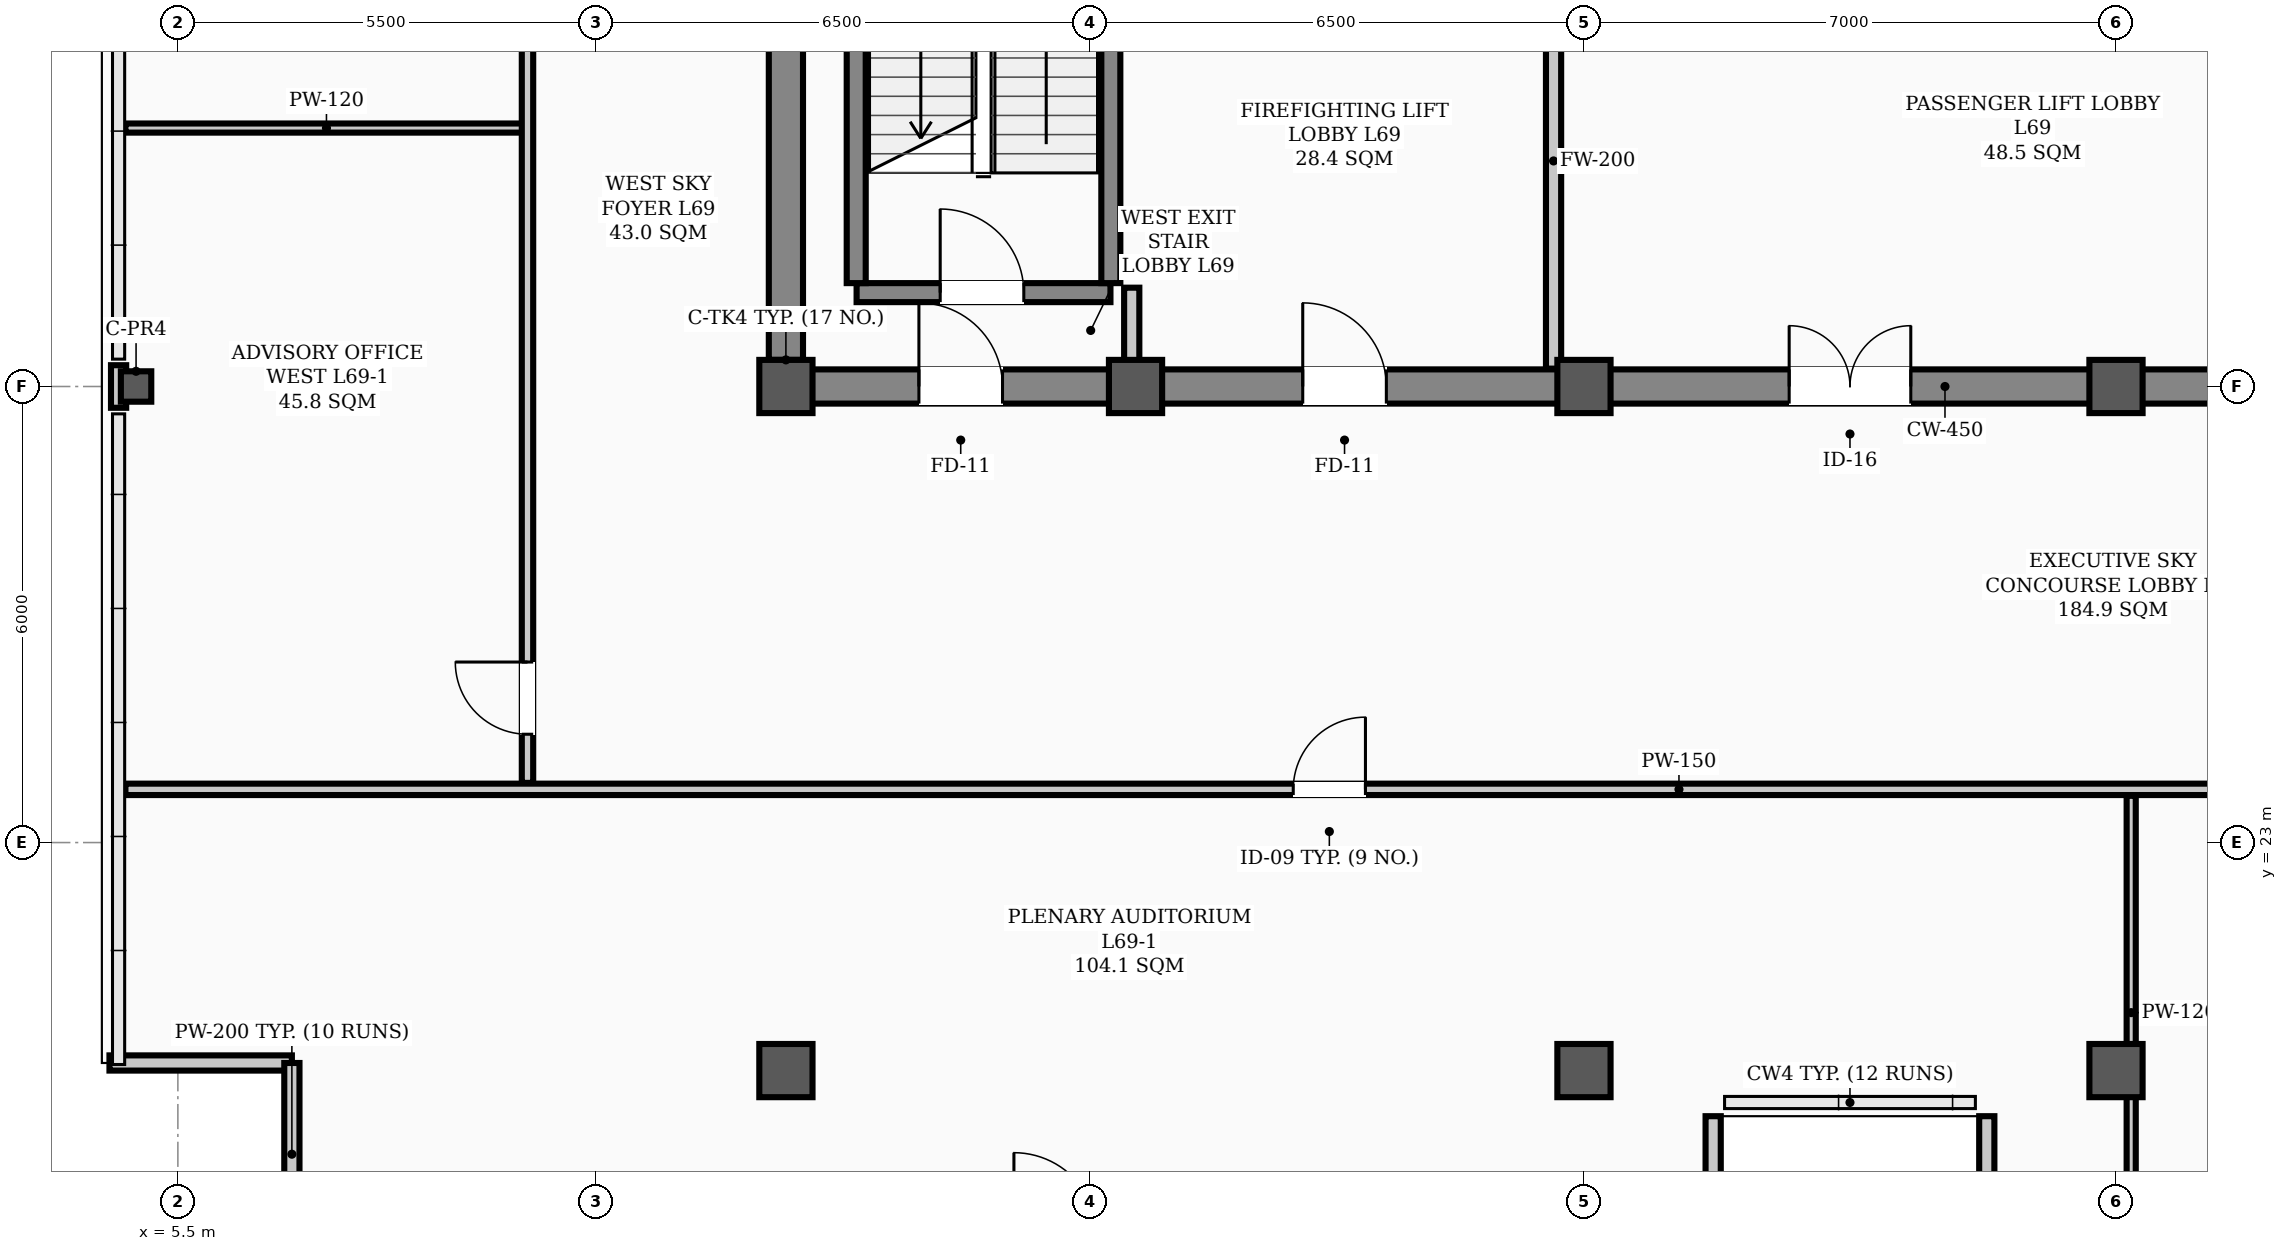
"""IFC4 building model, lengths in metres.
Left out: names, types, materials, properties, quantities, classifications, styles, units other than length and angle.
Written with IfcOpenShell. Run it as: python <this file> out.ifc"""

import sys

from ifc_helpers import new_model, si_unit, direction, frame, frame_2d, origin, origin_2d, place, context, subcontext, project, spatial, rectangle, hollow_rectangle, extrude, element, fill, save


model = new_model("IFC4")
c1 = context("Model", 3, precision=1e-05, world=origin(), true_north=direction((0.0, 1.0)))
c2 = subcontext(c1, "Body", "Model", "MODEL_VIEW")
j1 = project(units=[si_unit("LENGTHUNIT", "METRE"), si_unit("PLANEANGLEUNIT", "RADIAN")], contexts=[c1])
p1 = place(None, origin())
s1 = spatial("IfcSite", under=j1, at=p1, CompositionType="ELEMENT")
p2 = place(p1, origin())
s2 = spatial("IfcBuilding", under=s1, at=p2, CompositionType="ELEMENT")
p3 = place(p2, frame((0.0, 0.0, 277.4)))
s3 = spatial("IfcBuildingStorey", under=s2, at=p3, CompositionType="ELEMENT", Elevation=277.4)
for number, where, z_axis, x_axis in (
    (1, (13.5, 29.0, 0.0), (0.0, 0.0, 1.0), (1.0, 0.0, 0.0)),
    (2, (18.1, 29.0, 0.0), (0.0, 0.0, 1.0), (1.0, 0.0, 0.0)),
    (3, (24.0, 29.0, 0.0), (0.0, 0.0, 1.0), (1.0, 0.0, 0.0)),
    (4, (31.0, 29.0, 0.0), (0.0, 0.0, 1.0), (1.0, 0.0, 0.0)),
    (5, (13.5, 20.0, 0.0), (0.0, 0.0, 1.0), (1.0, 0.0, 0.0)),
    (6, (24.0, 20.0, 0.0), (0.0, 0.0, 1.0), (1.0, 0.0, 0.0)),
    (7, (31.0, 20.0, 0.0), (0.0, 0.0, 1.0), (1.0, 0.0, 0.0)),
):
    element("IfcColumn", number, at=place(p3, frame(where, z_axis=z_axis, x_axis=x_axis)), inside=s3, PredefinedType="COLUMN", context=c2, shape_type="SweptSolid", body=[
        extrude(hollow_rectangle(XDim=0.7, YDim=0.7, WallThickness=0.028, InnerFilletRadius=0.014, OuterFilletRadius=0.042, at=origin_2d()), origin(), (0.0, 0.0, 1.0), 3.9),
    ])
p4 = place(p3, frame((4.95, 29.0, 0.0), z_axis=(0.0, 0.0, 1.0), x_axis=(1.0, 0.0, 0.0)))
e8 = element("IfcColumn", 8, at=p4, inside=s3, PredefinedType="COLUMN", context=c2, shape_type="SweptSolid", body=[
    extrude(hollow_rectangle(XDim=0.4, YDim=0.4, WallThickness=0.02, InnerFilletRadius=0.02, OuterFilletRadius=0.04, at=origin_2d()), origin(), (0.0, 0.0, 1.0), 3.66),
])
p5 = place(p3, frame((4.72, 28.72, 0.0), z_axis=(0.0, 0.0, 1.0), x_axis=(0.0, 1.0, 0.0)))
e9 = element("IfcWall", 9, at=p5, inside=s3, PredefinedType="PARAPET", context=c2, shape_type="SweptSolid", body=[
    extrude(rectangle(XDim=0.56, YDim=0.2, at=frame_2d((0.28, 0.0))), origin(), (0.0, 0.0, 1.0), 1.2),
])
p6 = place(p3, frame((4.6, 20.1, 0.0), z_axis=(0.0, 0.0, 1.0), x_axis=(1.0, 0.0, 0.0)))
e10 = element("IfcWall", 10, at=p6, inside=s3, PredefinedType="PARAPET", context=c2, shape_type="SweptSolid", body=[
    extrude(rectangle(XDim=2.4, YDim=0.2, at=frame_2d((1.2, 0.0))), origin(), (0.0, 0.0, 1.0), 1.2),
])
p7 = place(p3, frame((7.0, 20.1, 0.0), z_axis=(0.0, 0.0, 1.0), x_axis=(0.0, -1.0, 0.0)))
e11 = element("IfcWall", 11, at=p7, inside=s3, PredefinedType="PARAPET", context=c2, shape_type="SweptSolid", body=[
    extrude(rectangle(XDim=2.4, YDim=0.2, at=frame_2d((1.2, 0.0))), origin(), (0.0, 0.0, 1.0), 1.2),
])
for number, where, z_axis, x_axis in (
    (12, (25.7, 17.7, 0.0), (0.0, 0.0, 1.0), (0.0, 1.0, 0.0)),
    (13, (29.3, 19.4, 0.0), (0.0, 0.0, 1.0), (0.0, -1.0, 0.0)),
):
    element("IfcWall", number, at=place(p3, frame(where, z_axis=z_axis, x_axis=x_axis)), inside=s3, PredefinedType="PARAPET", context=c2, shape_type="SweptSolid", body=[
        extrude(rectangle(XDim=1.7, YDim=0.2, at=frame_2d((0.85, 0.0))), origin(), (0.0, 0.0, 1.0), 1.2),
    ])
p8 = place(p3, frame((13.5, 29.0, 0.0), z_axis=(0.0, 0.0, 1.0), x_axis=(1.0, 0.0, 0.0)))
e14 = element("IfcWall", 14, at=p8, inside=s3, PredefinedType="SHEAR", context=c2, shape_type="SweptSolid", body=[
    extrude(rectangle(XDim=30.5, YDim=0.45, at=frame_2d((15.25, 0.0))), origin(), (0.0, 0.0, 1.0), 3.66),
])
p9 = place(p8, frame((1.75, 0.0, 0.0)))
e15 = element("IfcOpeningElement", 15, at=p9, cuts=e14, PredefinedType="OPENING", context=c2, shape_type="SweptSolid", body=[
    extrude(rectangle(XDim=1.1, YDim=2.08, at=frame_2d((0.55, 1.04))), frame((0.0, 0.235, 0.0), z_axis=(0.0, -1.0, 0.0), x_axis=(1.0, 0.0, 0.0)), (0.0, 0.0, 1.0), 0.47),
])
p10 = place(p8, frame((26.7, 0.0, 0.0)))
e16 = element("IfcOpeningElement", 16, at=p10, cuts=e14, PredefinedType="OPENING", context=c2, shape_type="SweptSolid", body=[
    extrude(rectangle(XDim=1.1, YDim=2.08, at=frame_2d((0.55, 1.04))), frame((0.0, 0.235, 0.0), z_axis=(0.0, -1.0, 0.0), x_axis=(1.0, 0.0, 0.0)), (0.0, 0.0, 1.0), 0.47),
])
p11 = place(p8, frame((6.8, 0.0, 0.0)))
e17 = element("IfcOpeningElement", 17, at=p11, cuts=e14, PredefinedType="OPENING", context=c2, shape_type="SweptSolid", body=[
    extrude(rectangle(XDim=1.1, YDim=2.08, at=frame_2d((0.55, 1.04))), frame((0.0, 0.235, 0.0), z_axis=(0.0, -1.0, 0.0), x_axis=(1.0, 0.0, 0.0)), (0.0, 0.0, 1.0), 0.47),
])
p12 = place(p8, frame((13.2, 0.0, 0.0)))
e18 = element("IfcOpeningElement", 18, at=p12, cuts=e14, PredefinedType="OPENING", context=c2, shape_type="SweptSolid", body=[
    extrude(rectangle(XDim=1.6, YDim=2.08, at=frame_2d((0.8, 1.04))), frame((0.0, 0.235, 0.0), z_axis=(0.0, -1.0, 0.0), x_axis=(1.0, 0.0, 0.0)), (0.0, 0.0, 1.0), 0.47),
])
p13 = place(p8, frame((19.5, 0.0, 0.0)))
e19 = element("IfcOpeningElement", 19, at=p13, cuts=e14, PredefinedType="OPENING", context=c2, shape_type="SweptSolid", body=[
    extrude(rectangle(XDim=0.9, YDim=2.08, at=frame_2d((0.45, 1.04))), frame((0.0, 0.235, 0.0), z_axis=(0.0, -1.0, 0.0), x_axis=(1.0, 0.0, 0.0)), (0.0, 0.0, 1.0), 0.47),
])
p14 = place(p8, frame((21.55, 0.0, 0.0)))
e20 = element("IfcOpeningElement", 20, at=p14, cuts=e14, PredefinedType="OPENING", context=c2, shape_type="SweptSolid", body=[
    extrude(rectangle(XDim=0.9, YDim=2.08, at=frame_2d((0.45, 1.04))), frame((0.0, 0.235, 0.0), z_axis=(0.0, -1.0, 0.0), x_axis=(1.0, 0.0, 0.0)), (0.0, 0.0, 1.0), 0.47),
])
p15 = place(p3, frame((13.5, 29.35, 0.0), z_axis=(0.0, 0.0, 1.0), x_axis=(0.0, 1.0, 0.0)))
e21 = element("IfcWall", 21, at=p15, inside=s3, PredefinedType="SHEAR", context=c2, shape_type="SweptSolid", body=[
    extrude(rectangle(XDim=8.6, YDim=0.45, at=frame_2d((4.3, 0.0))), origin(), (0.0, 0.0, 1.0), 3.66),
])
p16 = place(p3, frame((14.43, 30.235, 0.0), z_axis=(0.0, 0.0, 1.0), x_axis=(1.0, 0.0, 0.0)))
e22 = element("IfcWall", 22, at=p16, inside=s3, PredefinedType="STANDARD", context=c2, shape_type="SweptSolid", body=[
    extrude(rectangle(XDim=3.34, YDim=0.25, at=frame_2d((1.67, 0.0))), origin(), (0.0, 0.0, 1.0), 3.66),
])
p17 = place(p16, frame((1.1, 0.0, 0.0)))
e23 = element("IfcOpeningElement", 23, at=p17, cuts=e22, PredefinedType="OPENING", context=c2, shape_type="SweptSolid", body=[
    extrude(rectangle(XDim=1.1, YDim=2.08, at=frame_2d((0.55, 1.04))), frame((0.0, 0.135, 0.0), z_axis=(0.0, -1.0, 0.0), x_axis=(1.0, 0.0, 0.0)), (0.0, 0.0, 1.0), 0.27),
])
for number, where, z_axis, x_axis in (
    (24, (14.425, 30.36, 0.0), (0.0, 0.0, 1.0), (0.0, 1.0, 0.0)),
    (25, (17.775, 30.36, 0.0), (0.0, 0.0, 1.0), (0.0, 1.0, 0.0)),
):
    element("IfcWall", number, at=place(p3, frame(where, z_axis=z_axis, x_axis=x_axis)), inside=s3, PredefinedType="STANDARD", context=c2, shape_type="SweptSolid", body=[
        extrude(rectangle(XDim=7.184, YDim=0.25, at=frame_2d((3.592, 0.0))), origin(), (0.0, 0.0, 1.0), 3.66),
    ])
p18 = place(p3, frame((4.81, 23.7, 0.0), z_axis=(0.0, 0.0, 1.0), x_axis=(1.0, 0.0, 0.0)))
e26 = element("IfcWall", 26, at=p18, inside=s3, PredefinedType="PARTITIONING", context=c2, shape_type="SweptSolid", body=[
    extrude(rectangle(XDim=40.88, YDim=0.15, at=frame_2d((20.44, 0.0))), origin(), (0.0, 0.0, 1.0), 2.24),
])
p19 = place(p18, frame((15.365, 0.0, 0.0)))
e27 = element("IfcOpeningElement", 27, at=p19, cuts=e26, PredefinedType="OPENING", context=c2, shape_type="SweptSolid", body=[
    extrude(rectangle(XDim=0.95, YDim=2.08, at=frame_2d((0.475, 1.04))), frame((0.0, 0.085, 0.0), z_axis=(0.0, -1.0, 0.0), x_axis=(1.0, 0.0, 0.0)), (0.0, 0.0, 1.0), 0.17),
])
p20 = place(p18, frame((34.06, 0.0, 0.0)))
e28 = element("IfcOpeningElement", 28, at=p20, cuts=e26, PredefinedType="OPENING", context=c2, shape_type="SweptSolid", body=[
    extrude(rectangle(XDim=0.95, YDim=2.08, at=frame_2d((0.475, 1.04))), frame((0.0, 0.085, 0.0), z_axis=(0.0, -1.0, 0.0), x_axis=(1.0, 0.0, 0.0)), (0.0, 0.0, 1.0), 0.17),
])
p21 = place(p3, frame((4.81, 32.4, 0.0), z_axis=(0.0, 0.0, 1.0), x_axis=(1.0, 0.0, 0.0)))
e29 = element("IfcWall", 29, at=p21, inside=s3, PredefinedType="PARTITIONING", context=c2, shape_type="SweptSolid", body=[
    extrude(rectangle(XDim=5.29, YDim=0.12, at=frame_2d((2.645, 0.0))), origin(), (0.0, 0.0, 1.0), 3.66),
])
p22 = place(p3, frame((18.05, 29.235, 0.0), z_axis=(0.0, 0.0, 1.0), x_axis=(0.0, 1.0, 0.0)))
e30 = element("IfcWall", 30, at=p22, inside=s3, PredefinedType="STANDARD", context=c2, shape_type="SweptSolid", body=[
    extrude(rectangle(XDim=1.065, YDim=0.2, at=frame_2d((0.532, 0.0))), origin(), (0.0, 0.0, 1.0), 2.24),
])
p23 = place(p3, frame((23.6, 29.235, 0.0), z_axis=(0.0, 0.0, 1.0), x_axis=(0.0, 1.0, 0.0)))
e31 = element("IfcWall", 31, at=p23, inside=s3, PredefinedType="STANDARD", context=c2, shape_type="SweptSolid", body=[
    extrude(rectangle(XDim=5.465, YDim=0.2, at=frame_2d((2.732, 0.0))), origin(), (0.0, 0.0, 1.0), 2.24),
])
p24 = place(p3, frame((10.1, 23.785, 0.0), z_axis=(0.0, 0.0, 1.0), x_axis=(0.0, 1.0, 0.0)))
e32 = element("IfcWall", 32, at=p24, inside=s3, PredefinedType="PARTITIONING", context=c2, shape_type="SweptSolid", body=[
    extrude(rectangle(XDim=17.88, YDim=0.15, at=frame_2d((8.94, 0.0))), origin(), (0.0, 0.0, 1.0), 2.24),
])
p25 = place(p24, frame((0.64, 0.0, 0.0)))
e33 = element("IfcOpeningElement", 33, at=p25, cuts=e32, PredefinedType="OPENING", context=c2, shape_type="SweptSolid", body=[
    extrude(rectangle(XDim=0.95, YDim=2.08, at=frame_2d((0.475, 1.04))), frame((0.0, 0.085, 0.0), z_axis=(0.0, -1.0, 0.0), x_axis=(1.0, 0.0, 0.0)), (0.0, 0.0, 1.0), 0.17),
])
p26 = place(p24, frame((9.94, 0.0, 0.0)))
e34 = element("IfcOpeningElement", 34, at=p26, cuts=e32, PredefinedType="OPENING", context=c2, shape_type="SweptSolid", body=[
    extrude(rectangle(XDim=0.95, YDim=2.08, at=frame_2d((0.475, 1.04))), frame((0.0, 0.085, 0.0), z_axis=(0.0, -1.0, 0.0), x_axis=(1.0, 0.0, 0.0)), (0.0, 0.0, 1.0), 0.17),
])
p27 = place(p24, frame((14.615, 0.0, 0.0)))
e35 = element("IfcOpeningElement", 35, at=p27, cuts=e32, PredefinedType="OPENING", context=c2, shape_type="SweptSolid", body=[
    extrude(rectangle(XDim=0.95, YDim=2.08, at=frame_2d((0.475, 1.04))), frame((0.0, 0.085, 0.0), z_axis=(0.0, -1.0, 0.0), x_axis=(1.0, 0.0, 0.0)), (0.0, 0.0, 1.0), 0.17),
])
p28 = place(p3, frame((31.2, 17.91, 0.0), z_axis=(0.0, 0.0, 1.0), x_axis=(0.0, 1.0, 0.0)))
e36 = element("IfcWall", 36, at=p28, inside=s3, PredefinedType="PARTITIONING", context=c2, shape_type="SweptSolid", body=[
    extrude(rectangle(XDim=5.705, YDim=0.12, at=frame_2d((2.853, 0.0))), origin(), (0.0, 0.0, 1.0), 2.24),
])
p29 = place(p17, origin())
e37 = element("IfcDoor", 37, at=p29, inside=s3, OperationType="SINGLE_SWING_LEFT", PredefinedType="DOOR", context=c2, shape_type="SweptSolid", body=[
    extrude(rectangle(XDim=1.1, YDim=2.08, at=frame_2d((0.55, 1.04))), frame((0.0, 0.025, 0.0), z_axis=(0.0, -1.0, 0.0), x_axis=(1.0, 0.0, 0.0)), (0.0, 0.0, 1.0), 0.05),
])
fill(e23, e37)
p30 = place(p9, origin())
e38 = element("IfcDoor", 38, at=p30, inside=s3, OperationType="SINGLE_SWING_LEFT", PredefinedType="DOOR", context=c2, shape_type="SweptSolid", body=[
    extrude(rectangle(XDim=1.1, YDim=2.08, at=frame_2d((0.55, 1.04))), frame((0.0, 0.025, 0.0), z_axis=(0.0, -1.0, 0.0), x_axis=(1.0, 0.0, 0.0)), (0.0, 0.0, 1.0), 0.05),
])
fill(e15, e38)
p31 = place(p11, origin())
e39 = element("IfcDoor", 39, at=p31, inside=s3, OperationType="SINGLE_SWING_LEFT", PredefinedType="DOOR", context=c2, shape_type="SweptSolid", body=[
    extrude(rectangle(XDim=1.1, YDim=2.08, at=frame_2d((0.55, 1.04))), frame((0.0, 0.025, 0.0), z_axis=(0.0, -1.0, 0.0), x_axis=(1.0, 0.0, 0.0)), (0.0, 0.0, 1.0), 0.05),
])
fill(e17, e39)
p32 = place(p12, origin())
e40 = element("IfcDoor", 40, at=p32, inside=s3, OperationType="DOUBLE_DOOR_SINGLE_SWING", PredefinedType="DOOR", context=c2, shape_type="SweptSolid", body=[
    extrude(rectangle(XDim=1.6, YDim=2.08, at=frame_2d((0.8, 1.04))), frame((0.0, 0.025, 0.0), z_axis=(0.0, -1.0, 0.0), x_axis=(1.0, 0.0, 0.0)), (0.0, 0.0, 1.0), 0.05),
])
fill(e18, e40)
p33 = place(p19, origin())
e41 = element("IfcDoor", 41, at=p33, inside=s3, OperationType="SINGLE_SWING_RIGHT", PredefinedType="DOOR", context=c2, shape_type="SweptSolid", body=[
    extrude(rectangle(XDim=0.95, YDim=2.08, at=frame_2d((0.475, 1.04))), frame((0.0, 0.025, 0.0), z_axis=(0.0, -1.0, 0.0), x_axis=(1.0, 0.0, 0.0)), (0.0, 0.0, 1.0), 0.05),
])
fill(e27, e41)
p34 = place(p25, origin())
e42 = element("IfcDoor", 42, at=p34, inside=s3, OperationType="SINGLE_SWING_RIGHT", PredefinedType="DOOR", context=c2, shape_type="SweptSolid", body=[
    extrude(rectangle(XDim=0.95, YDim=2.08, at=frame_2d((0.475, 1.04))), frame((0.0, 0.025, 0.0), z_axis=(0.0, -1.0, 0.0), x_axis=(1.0, 0.0, 0.0)), (0.0, 0.0, 1.0), 0.05),
])
fill(e33, e42)
save(model, sys.argv[1])
